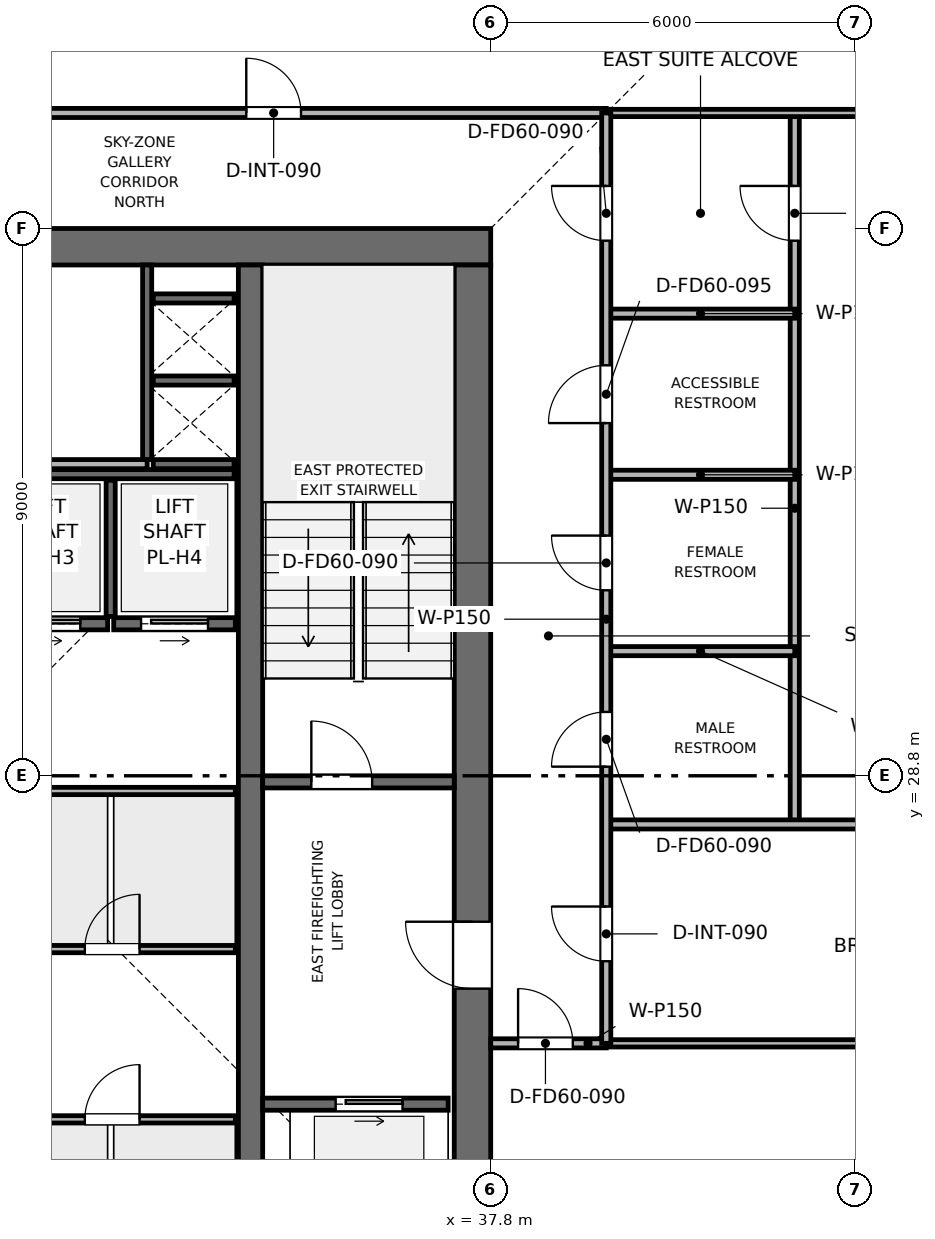
"""IFC4 building model, lengths in metres.
Left out: names, types, materials, properties, quantities, classifications, styles, units other than length and angle.
Written with IfcOpenShell. Run it as: python <this file> out.ifc"""

import sys

from ifc_helpers import new_model, si_unit, direction, frame, frame_2d, origin, place, context, subcontext, project, spatial, rectangle, extrude, element, fill, save


model = new_model("IFC4")
c1 = context("Model", 3, precision=1e-05, world=origin(), true_north=direction((0.0, 1.0)))
c2 = subcontext(c1, "Body", "Model", "MODEL_VIEW")
j1 = project(units=[si_unit("LENGTHUNIT", "METRE"), si_unit("PLANEANGLEUNIT", "RADIAN")], contexts=[c1])
p1 = place(None, origin())
s1 = spatial("IfcSite", under=j1, at=p1, CompositionType="ELEMENT")
p2 = place(p1, origin())
s2 = spatial("IfcBuilding", under=s1, at=p2, CompositionType="ELEMENT")
p3 = place(p2, frame((0.0, 0.0, 333.0)))
s3 = spatial("IfcBuildingStorey", under=s2, at=p3, CompositionType="ELEMENT", Elevation=333.0)
p4 = place(p3, frame((19.8, 37.5, 0.0), z_axis=(0.0, 0.0, 1.0), x_axis=(1.0, 0.0, 0.0)))
e1 = element("IfcWall", 1, at=p4, inside=s3, PredefinedType="SHEAR", context=c2, shape_type="SweptSolid", body=[
    extrude(rectangle(XDim=18.0, YDim=0.6, at=frame_2d((9.0, 0.0))), origin(), (0.0, 0.0, 1.0), 3.75),
])
p5 = place(p4, frame((7.05, 0.0, 0.0)))
e2 = element("IfcOpeningElement", 2, at=p5, cuts=e1, PredefinedType="OPENING", context=c2, shape_type="SweptSolid", body=[
    extrude(rectangle(XDim=1.1, YDim=2.15, at=frame_2d((0.55, 1.075))), frame((0.0, 0.31, 0.0), z_axis=(0.0, -1.0, 0.0), x_axis=(1.0, 0.0, 0.0)), (0.0, 0.0, 1.0), 0.62),
])
p6 = place(p3, frame((37.5, 20.4, 0.0), z_axis=(0.0, 0.0, 1.0), x_axis=(0.0, 1.0, 0.0)))
e3 = element("IfcWall", 3, at=p6, inside=s3, PredefinedType="SHEAR", context=c2, shape_type="SweptSolid", body=[
    extrude(rectangle(XDim=16.8, YDim=0.6, at=frame_2d((8.4, 0.0))), origin(), (0.0, 0.0, 1.0), 3.75),
])
p7 = place(p6, frame((4.9, 0.0, 0.0)))
e4 = element("IfcOpeningElement", 4, at=p7, cuts=e3, PredefinedType="OPENING", context=c2, shape_type="SweptSolid", body=[
    extrude(rectangle(XDim=1.1, YDim=2.15, at=frame_2d((0.55, 1.075))), frame((0.0, 0.31, 0.0), z_axis=(0.0, -1.0, 0.0), x_axis=(1.0, 0.0, 0.0)), (0.0, 0.0, 1.0), 0.62),
])
p8 = place(p3, frame((33.85, 20.4, 0.0), z_axis=(0.0, 0.0, 1.0), x_axis=(0.0, 1.0, 0.0)))
e5 = element("IfcWall", 5, at=p8, inside=s3, PredefinedType="SHEAR", context=c2, shape_type="SweptSolid", body=[
    extrude(rectangle(XDim=16.8, YDim=0.4, at=frame_2d((8.4, 0.0))), origin(), (0.0, 0.0, 1.0), 3.75),
])
p9 = place(p3, frame((34.05, 28.7, 0.0), z_axis=(0.0, 0.0, 1.0), x_axis=(1.0, 0.0, 0.0)))
e6 = element("IfcWall", 6, at=p9, inside=s3, PredefinedType="SHEAR", context=c2, shape_type="SweptSolid", body=[
    extrude(rectangle(XDim=3.15, YDim=0.2, at=frame_2d((1.575, 0.0))), origin(), (0.0, 0.0, 1.0), 3.51),
])
p10 = place(p9, frame((0.8, 0.0, 0.0)))
e7 = element("IfcOpeningElement", 7, at=p10, cuts=e6, PredefinedType="OPENING", context=c2, shape_type="SweptSolid", body=[
    extrude(rectangle(XDim=1.0, YDim=2.1, at=frame_2d((0.5, 1.05))), frame((0.0, 0.11, 0.0), z_axis=(0.0, -1.0, 0.0), x_axis=(1.0, 0.0, 0.0)), (0.0, 0.0, 1.0), 0.22),
])
p11 = place(p3, frame((32.15, 34.0, 0.0), z_axis=(0.0, 0.0, 1.0), x_axis=(0.0, 1.0, 0.0)))
e8 = element("IfcWall", 8, at=p11, inside=s3, PredefinedType="SHEAR", context=c2, shape_type="SweptSolid", body=[
    extrude(rectangle(XDim=3.2, YDim=0.15, at=frame_2d((1.6, 0.0))), origin(), (0.0, 0.0, 1.0), 3.51),
])
for number, where, z_axis, x_axis in (
    (9, (32.25, 33.925, 0.0), (0.0, 0.0, 1.0), (1.0, 0.0, 0.0)),
    (10, (32.25, 35.3, 0.0), (0.0, 0.0, 1.0), (1.0, 0.0, 0.0)),
):
    element("IfcWall", number, at=place(p3, frame(where, z_axis=z_axis, x_axis=x_axis)), inside=s3, PredefinedType="SHEAR", context=c2, shape_type="SweptSolid", body=[
        extrude(rectangle(XDim=1.33, YDim=0.15, at=frame_2d((0.665, 0.0))), origin(), (0.0, 0.0, 1.0), 3.51),
    ])
p12 = place(p3, frame((34.05, 23.4, 0.0), z_axis=(0.0, 0.0, 1.0), x_axis=(1.0, 0.0, 0.0)))
e11 = element("IfcWall", 11, at=p12, inside=s3, PredefinedType="SHEAR", context=c2, shape_type="SweptSolid", body=[
    extrude(rectangle(XDim=3.05, YDim=0.2, at=frame_2d((1.525, 0.0))), origin(), (0.0, 0.0, 1.0), 3.51),
])
p13 = place(p12, frame((1.2, 0.0, 0.0)))
e12 = element("IfcOpeningElement", 12, at=p13, cuts=e11, PredefinedType="OPENING", context=c2, shape_type="SweptSolid", body=[
    extrude(rectangle(XDim=1.1, YDim=2.15, at=frame_2d((0.55, 1.075))), frame((0.0, 0.11, 0.0), z_axis=(0.0, -1.0, 0.0), x_axis=(1.0, 0.0, 0.0)), (0.0, 0.0, 1.0), 0.22),
])
p14 = place(p3, frame((29.5, 31.3, 0.0), z_axis=(0.0, 0.0, 1.0), x_axis=(1.0, 0.0, 0.0)))
e13 = element("IfcWall", 13, at=p14, inside=s3, PredefinedType="SHEAR", context=c2, shape_type="SweptSolid", body=[
    extrude(rectangle(XDim=2.0, YDim=0.2, at=frame_2d((1.0, 0.0))), origin(), (0.0, 0.0, 1.0), 3.51),
])
p15 = place(p14, frame((0.45, 0.0, 0.0)))
e14 = element("IfcOpeningElement", 14, at=p15, cuts=e13, PredefinedType="OPENING", context=c2, shape_type="SweptSolid", body=[
    extrude(rectangle(XDim=1.1, YDim=2.15, at=frame_2d((0.55, 1.075))), frame((0.0, 0.11, 0.0), z_axis=(0.0, -1.0, 0.0), x_axis=(1.0, 0.0, 0.0)), (0.0, 0.0, 1.0), 0.22),
])
p16 = place(p3, frame((31.6, 31.3, 0.0), z_axis=(0.0, 0.0, 1.0), x_axis=(1.0, 0.0, 0.0)))
e15 = element("IfcWall", 15, at=p16, inside=s3, PredefinedType="SHEAR", context=c2, shape_type="SweptSolid", body=[
    extrude(rectangle(XDim=2.0, YDim=0.2, at=frame_2d((1.0, 0.0))), origin(), (0.0, 0.0, 1.0), 3.51),
])
p17 = place(p16, frame((0.45, 0.0, 0.0)))
e16 = element("IfcOpeningElement", 16, at=p17, cuts=e15, PredefinedType="OPENING", context=c2, shape_type="SweptSolid", body=[
    extrude(rectangle(XDim=1.1, YDim=2.15, at=frame_2d((0.55, 1.075))), frame((0.0, 0.11, 0.0), z_axis=(0.0, -1.0, 0.0), x_axis=(1.0, 0.0, 0.0)), (0.0, 0.0, 1.0), 0.22),
])
p18 = place(p3, frame((32.25, 36.65, 0.0), z_axis=(0.0, 0.0, 1.0), x_axis=(1.0, 0.0, 0.0)))
e17 = element("IfcWall", 17, at=p18, inside=s3, PredefinedType="SHEAR", context=c2, shape_type="SweptSolid", body=[
    extrude(rectangle(XDim=1.33, YDim=0.15, at=frame_2d((0.665, 0.0))), origin(), (0.0, 0.0, 1.0), 3.51),
])
p19 = place(p3, frame((29.5, 33.76, 0.0), z_axis=(0.0, 0.0, 1.0), x_axis=(1.0, 0.0, 0.0)))
e18 = element("IfcWall", 18, at=p19, inside=s3, PredefinedType="SHEAR", context=c2, shape_type="SweptSolid", body=[
    extrude(rectangle(XDim=4.08, YDim=0.15, at=frame_2d((2.04, 0.0))), origin(), (0.0, 0.0, 1.0), 3.51),
])
p20 = place(p3, frame((31.55, 31.42, 0.0), z_axis=(0.0, 0.0, 1.0), x_axis=(0.0, 1.0, 0.0)))
e19 = element("IfcWall", 19, at=p20, inside=s3, PredefinedType="SHEAR", context=c2, shape_type="SweptSolid", body=[
    extrude(rectangle(XDim=2.24, YDim=0.15, at=frame_2d((1.12, 0.0))), origin(), (0.0, 0.0, 1.0), 3.51),
])
p21 = place(p3, frame((29.525, 33.925, 0.0), z_axis=(0.0, 0.0, 1.0), x_axis=(1.0, 0.0, 0.0)))
e20 = element("IfcWall", 20, at=p21, inside=s3, PredefinedType="PARTITIONING", context=c2, shape_type="SweptSolid", body=[
    extrude(rectangle(XDim=2.625, YDim=0.15, at=frame_2d((1.312, 0.0))), origin(), (0.0, 0.0, 1.0), 3.51),
])
p22 = place(p3, frame((29.55, 23.15, 0.0), z_axis=(0.0, 0.0, 1.0), x_axis=(1.0, 0.0, 0.0)))
e21 = element("IfcWall", 21, at=p22, inside=s3, PredefinedType="PARTITIONING", context=c2, shape_type="SweptSolid", body=[
    extrude(rectangle(XDim=4.05, YDim=0.12, at=frame_2d((2.025, 0.0))), origin(), (0.0, 0.0, 1.0), 3.51),
])
p23 = place(p22, frame((1.575, 0.0, 0.0)))
e22 = element("IfcOpeningElement", 22, at=p23, cuts=e21, PredefinedType="OPENING", context=c2, shape_type="SweptSolid", body=[
    extrude(rectangle(XDim=0.9, YDim=2.1, at=frame_2d((0.45, 1.05))), frame((0.0, 0.07, 0.0), z_axis=(0.0, -1.0, 0.0), x_axis=(1.0, 0.0, 0.0)), (0.0, 0.0, 1.0), 0.14),
])
p24 = place(p3, frame((29.55, 25.95, 0.0), z_axis=(0.0, 0.0, 1.0), x_axis=(1.0, 0.0, 0.0)))
e23 = element("IfcWall", 23, at=p24, inside=s3, PredefinedType="PARTITIONING", context=c2, shape_type="SweptSolid", body=[
    extrude(rectangle(XDim=4.05, YDim=0.12, at=frame_2d((2.025, 0.0))), origin(), (0.0, 0.0, 1.0), 3.51),
])
p25 = place(p24, frame((1.575, 0.0, 0.0)))
e24 = element("IfcOpeningElement", 24, at=p25, cuts=e23, PredefinedType="OPENING", context=c2, shape_type="SweptSolid", body=[
    extrude(rectangle(XDim=0.9, YDim=2.1, at=frame_2d((0.45, 1.05))), frame((0.0, 0.07, 0.0), z_axis=(0.0, -1.0, 0.0), x_axis=(1.0, 0.0, 0.0)), (0.0, 0.0, 1.0), 0.14),
])
p26 = place(p3, frame((29.55, 28.55, 0.0), z_axis=(0.0, 0.0, 1.0), x_axis=(1.0, 0.0, 0.0)))
e25 = element("IfcWall", 25, at=p26, inside=s3, PredefinedType="PARTITIONING", context=c2, shape_type="SweptSolid", body=[
    extrude(rectangle(XDim=4.05, YDim=0.12, at=frame_2d((2.025, 0.0))), origin(), (0.0, 0.0, 1.0), 3.51),
])
p27 = place(p3, frame((37.8, 24.4, 0.0), z_axis=(0.0, 0.0, 1.0), x_axis=(1.0, 0.0, 0.0)))
e26 = element("IfcWall", 26, at=p27, inside=s3, PredefinedType="PARTITIONING", context=c2, shape_type="SweptSolid", body=[
    extrude(rectangle(XDim=1.9, YDim=0.15, at=frame_2d((0.95, 0.0))), origin(), (0.0, 0.0, 1.0), 3.51),
])
p28 = place(p27, frame((0.45, 0.0, 0.0)))
e27 = element("IfcOpeningElement", 27, at=p28, cuts=e26, PredefinedType="OPENING", context=c2, shape_type="SweptSolid", body=[
    extrude(rectangle(XDim=0.9, YDim=2.1, at=frame_2d((0.45, 1.05))), frame((0.0, 0.085, 0.0), z_axis=(0.0, -1.0, 0.0), x_axis=(1.0, 0.0, 0.0)), (0.0, 0.0, 1.0), 0.17),
])
p29 = place(p3, frame((39.7, 24.4, 0.0), z_axis=(0.0, 0.0, 1.0), x_axis=(1.0, 0.0, 0.0)))
e28 = element("IfcWall", 28, at=p29, inside=s3, PredefinedType="PARTITIONING", context=c2, shape_type="SweptSolid", body=[
    extrude(rectangle(XDim=11.17, YDim=0.12, at=frame_2d((5.585, 0.0))), origin(), (0.0, 0.0, 1.0), 3.135),
])
p30 = place(p3, frame((42.8, 28.0, 0.0), z_axis=(0.0, 0.0, 1.0), x_axis=(0.0, 1.0, 0.0)))
e29 = element("IfcWall", 29, at=p30, inside=s3, PredefinedType="PARTITIONING", context=c2, shape_type="SweptSolid", body=[
    extrude(rectangle(XDim=11.7, YDim=0.15, at=frame_2d((5.85, 0.0))), origin(), (0.0, 0.0, 1.0), 3.095),
])
p31 = place(p30, frame((9.6, 0.0, 0.0)))
e30 = element("IfcOpeningElement", 30, at=p31, cuts=e29, PredefinedType="OPENING", context=c2, shape_type="SweptSolid", body=[
    extrude(rectangle(XDim=0.9, YDim=2.1, at=frame_2d((0.45, 1.05))), frame((0.0, 0.085, 0.0), z_axis=(0.0, -1.0, 0.0), x_axis=(1.0, 0.0, 0.0)), (0.0, 0.0, 1.0), 0.17),
])
p32 = place(p3, frame((39.7, 28.0, 0.0), z_axis=(0.0, 0.0, 1.0), x_axis=(1.0, 0.0, 0.0)))
e31 = element("IfcWall", 31, at=p32, inside=s3, PredefinedType="PARTITIONING", context=c2, shape_type="SweptSolid", body=[
    extrude(rectangle(XDim=11.17, YDim=0.15, at=frame_2d((5.585, 0.0))), origin(), (0.0, 0.0, 1.0), 3.135),
])
for number, where, z_axis, x_axis in (
    (32, (39.7, 36.4, 0.0), (0.0, 0.0, 1.0), (1.0, 0.0, 0.0)),
    (33, (39.7, 30.85, 0.0), (0.0, 0.0, 1.0), (1.0, 0.0, 0.0)),
    (34, (39.7, 33.75, 0.0), (0.0, 0.0, 1.0), (1.0, 0.0, 0.0)),
):
    element("IfcWall", number, at=place(p3, frame(where, z_axis=z_axis, x_axis=x_axis)), inside=s3, PredefinedType="PARTITIONING", context=c2, shape_type="SweptSolid", body=[
        extrude(rectangle(XDim=3.1, YDim=0.15, at=frame_2d((1.55, 0.0))), origin(), (0.0, 0.0, 1.0), 3.135),
    ])
p33 = place(p3, frame((39.7, 39.7, 0.0), z_axis=(0.0, 0.0, 1.0), x_axis=(1.0, 0.0, 0.0)))
e35 = element("IfcWall", 35, at=p33, inside=s3, PredefinedType="PARTITIONING", context=c2, shape_type="SweptSolid", body=[
    extrude(rectangle(XDim=11.17, YDim=0.12, at=frame_2d((5.585, 0.0))), origin(), (0.0, 0.0, 1.0), 3.095),
])
p34 = place(p3, frame((17.9, 39.7, 0.0), z_axis=(0.0, 0.0, 1.0), x_axis=(1.0, 0.0, 0.0)))
e36 = element("IfcWall", 36, at=p34, inside=s3, PredefinedType="PARTITIONING", context=c2, shape_type="SweptSolid", body=[
    extrude(rectangle(XDim=21.8, YDim=0.15, at=frame_2d((10.9, 0.0))), origin(), (0.0, 0.0, 1.0), 3.095),
])
p35 = place(p34, frame((0.765, 0.0, 0.0)))
e37 = element("IfcOpeningElement", 37, at=p35, cuts=e36, PredefinedType="OPENING", context=c2, shape_type="SweptSolid", body=[
    extrude(rectangle(XDim=0.9, YDim=2.1, at=frame_2d((0.45, 1.05))), frame((0.0, 0.085, 0.0), z_axis=(0.0, -1.0, 0.0), x_axis=(1.0, 0.0, 0.0)), (0.0, 0.0, 1.0), 0.17),
])
p36 = place(p34, frame((6.195, 0.0, 0.0)))
e38 = element("IfcOpeningElement", 38, at=p36, cuts=e36, PredefinedType="OPENING", context=c2, shape_type="SweptSolid", body=[
    extrude(rectangle(XDim=0.9, YDim=2.1, at=frame_2d((0.45, 1.05))), frame((0.0, 0.085, 0.0), z_axis=(0.0, -1.0, 0.0), x_axis=(1.0, 0.0, 0.0)), (0.0, 0.0, 1.0), 0.17),
])
p37 = place(p34, frame((15.88, 0.0, 0.0)))
e39 = element("IfcOpeningElement", 39, at=p37, cuts=e36, PredefinedType="OPENING", context=c2, shape_type="SweptSolid", body=[
    extrude(rectangle(XDim=0.9, YDim=2.1, at=frame_2d((0.45, 1.05))), frame((0.0, 0.085, 0.0), z_axis=(0.0, -1.0, 0.0), x_axis=(1.0, 0.0, 0.0)), (0.0, 0.0, 1.0), 0.17),
])
p38 = place(p3, frame((39.7, 24.4, 0.0), z_axis=(0.0, 0.0, 1.0), x_axis=(0.0, 1.0, 0.0)))
e40 = element("IfcWall", 40, at=p38, inside=s3, PredefinedType="PARTITIONING", context=c2, shape_type="SweptSolid", body=[
    extrude(rectangle(XDim=15.3, YDim=0.15, at=frame_2d((7.65, 0.0))), origin(), (0.0, 0.0, 1.0), 3.095),
])
p39 = place(p38, frame((1.35, 0.0, 0.0)))
e41 = element("IfcOpeningElement", 41, at=p39, cuts=e40, PredefinedType="OPENING", context=c2, shape_type="SweptSolid", body=[
    extrude(rectangle(XDim=0.9, YDim=2.1, at=frame_2d((0.45, 1.05))), frame((0.0, 0.085, 0.0), z_axis=(0.0, -1.0, 0.0), x_axis=(1.0, 0.0, 0.0)), (0.0, 0.0, 1.0), 0.17),
])
p40 = place(p38, frame((4.55, 0.0, 0.0)))
e42 = element("IfcOpeningElement", 42, at=p40, cuts=e40, PredefinedType="OPENING", context=c2, shape_type="SweptSolid", body=[
    extrude(rectangle(XDim=0.9, YDim=2.1, at=frame_2d((0.45, 1.05))), frame((0.0, 0.085, 0.0), z_axis=(0.0, -1.0, 0.0), x_axis=(1.0, 0.0, 0.0)), (0.0, 0.0, 1.0), 0.17),
])
p41 = place(p38, frame((7.45, 0.0, 0.0)))
e43 = element("IfcOpeningElement", 43, at=p41, cuts=e40, PredefinedType="OPENING", context=c2, shape_type="SweptSolid", body=[
    extrude(rectangle(XDim=0.9, YDim=2.1, at=frame_2d((0.45, 1.05))), frame((0.0, 0.085, 0.0), z_axis=(0.0, -1.0, 0.0), x_axis=(1.0, 0.0, 0.0)), (0.0, 0.0, 1.0), 0.17),
])
p42 = place(p38, frame((10.2, 0.0, 0.0)))
e44 = element("IfcOpeningElement", 44, at=p42, cuts=e40, PredefinedType="OPENING", context=c2, shape_type="SweptSolid", body=[
    extrude(rectangle(XDim=0.95, YDim=2.1, at=frame_2d((0.475, 1.05))), frame((0.0, 0.085, 0.0), z_axis=(0.0, -1.0, 0.0), x_axis=(1.0, 0.0, 0.0)), (0.0, 0.0, 1.0), 0.17),
])
p43 = place(p38, frame((13.2, 0.0, 0.0)))
e45 = element("IfcOpeningElement", 45, at=p43, cuts=e40, PredefinedType="OPENING", context=c2, shape_type="SweptSolid", body=[
    extrude(rectangle(XDim=0.9, YDim=2.1, at=frame_2d((0.45, 1.05))), frame((0.0, 0.085, 0.0), z_axis=(0.0, -1.0, 0.0), x_axis=(1.0, 0.0, 0.0)), (0.0, 0.0, 1.0), 0.17),
])
p44 = place(p10, origin())
e46 = element("IfcDoor", 46, at=p44, inside=s3, OperationType="SINGLE_SWING_LEFT", PredefinedType="DOOR", context=c2, shape_type="SweptSolid", body=[
    extrude(rectangle(XDim=1.0, YDim=2.1, at=frame_2d((0.5, 1.05))), frame((0.0, 0.025, 0.0), z_axis=(0.0, -1.0, 0.0), x_axis=(1.0, 0.0, 0.0)), (0.0, 0.0, 1.0), 0.05),
])
fill(e7, e46)
p45 = place(p13, origin())
e47 = element("IfcDoor", 47, at=p45, inside=s3, OperationType="SLIDING_TO_RIGHT", PredefinedType="DOOR", context=c2, shape_type="SweptSolid", body=[
    extrude(rectangle(XDim=1.1, YDim=2.15, at=frame_2d((0.55, 1.075))), frame((0.0, 0.025, 0.0), z_axis=(0.0, -1.0, 0.0), x_axis=(1.0, 0.0, 0.0)), (0.0, 0.0, 1.0), 0.05),
])
fill(e12, e47)
p46 = place(p15, origin())
e48 = element("IfcDoor", 48, at=p46, inside=s3, OperationType="SLIDING_TO_RIGHT", PredefinedType="DOOR", context=c2, shape_type="SweptSolid", body=[
    extrude(rectangle(XDim=1.1, YDim=2.15, at=frame_2d((0.55, 1.075))), frame((0.0, 0.025, 0.0), z_axis=(0.0, -1.0, 0.0), x_axis=(1.0, 0.0, 0.0)), (0.0, 0.0, 1.0), 0.05),
])
fill(e14, e48)
p47 = place(p17, origin())
e49 = element("IfcDoor", 49, at=p47, inside=s3, OperationType="SLIDING_TO_RIGHT", PredefinedType="DOOR", context=c2, shape_type="SweptSolid", body=[
    extrude(rectangle(XDim=1.1, YDim=2.15, at=frame_2d((0.55, 1.075))), frame((0.0, 0.025, 0.0), z_axis=(0.0, -1.0, 0.0), x_axis=(1.0, 0.0, 0.0)), (0.0, 0.0, 1.0), 0.05),
])
fill(e16, e49)
p48 = place(p23, origin())
e50 = element("IfcDoor", 50, at=p48, inside=s3, OperationType="SINGLE_SWING_RIGHT", PredefinedType="DOOR", context=c2, shape_type="SweptSolid", body=[
    extrude(rectangle(XDim=0.9, YDim=2.1, at=frame_2d((0.45, 1.05))), frame((0.0, 0.025, 0.0), z_axis=(0.0, -1.0, 0.0), x_axis=(1.0, 0.0, 0.0)), (0.0, 0.0, 1.0), 0.05),
])
fill(e22, e50)
p49 = place(p25, origin())
e51 = element("IfcDoor", 51, at=p49, inside=s3, OperationType="SINGLE_SWING_RIGHT", PredefinedType="DOOR", context=c2, shape_type="SweptSolid", body=[
    extrude(rectangle(XDim=0.9, YDim=2.1, at=frame_2d((0.45, 1.05))), frame((0.0, 0.025, 0.0), z_axis=(0.0, -1.0, 0.0), x_axis=(1.0, 0.0, 0.0)), (0.0, 0.0, 1.0), 0.05),
])
fill(e24, e51)
p50 = place(p28, origin())
e52 = element("IfcDoor", 52, at=p50, inside=s3, OperationType="SINGLE_SWING_LEFT", PredefinedType="DOOR", context=c2, shape_type="SweptSolid", body=[
    extrude(rectangle(XDim=0.9, YDim=2.1, at=frame_2d((0.45, 1.05))), frame((0.0, 0.025, 0.0), z_axis=(0.0, -1.0, 0.0), x_axis=(1.0, 0.0, 0.0)), (0.0, 0.0, 1.0), 0.05),
])
fill(e27, e52)
p51 = place(p31, origin())
e53 = element("IfcDoor", 53, at=p51, inside=s3, OperationType="SINGLE_SWING_RIGHT", PredefinedType="DOOR", context=c2, shape_type="SweptSolid", body=[
    extrude(rectangle(XDim=0.9, YDim=2.1, at=frame_2d((0.45, 1.05))), frame((0.0, 0.025, 0.0), z_axis=(0.0, -1.0, 0.0), x_axis=(1.0, 0.0, 0.0)), (0.0, 0.0, 1.0), 0.05),
])
fill(e30, e53)
p52 = place(p37, origin())
e54 = element("IfcDoor", 54, at=p52, inside=s3, OperationType="SINGLE_SWING_LEFT", PredefinedType="DOOR", context=c2, shape_type="SweptSolid", body=[
    extrude(rectangle(XDim=0.9, YDim=2.1, at=frame_2d((0.45, 1.05))), frame((0.0, 0.025, 0.0), z_axis=(0.0, -1.0, 0.0), x_axis=(1.0, 0.0, 0.0)), (0.0, 0.0, 1.0), 0.05),
])
fill(e39, e54)
p53 = place(p39, origin())
e55 = element("IfcDoor", 55, at=p53, inside=s3, OperationType="SINGLE_SWING_RIGHT", PredefinedType="DOOR", context=c2, shape_type="SweptSolid", body=[
    extrude(rectangle(XDim=0.9, YDim=2.1, at=frame_2d((0.45, 1.05))), frame((0.0, 0.025, 0.0), z_axis=(0.0, -1.0, 0.0), x_axis=(1.0, 0.0, 0.0)), (0.0, 0.0, 1.0), 0.05),
])
fill(e41, e55)
p54 = place(p40, origin())
e56 = element("IfcDoor", 56, at=p54, inside=s3, OperationType="SINGLE_SWING_LEFT", PredefinedType="DOOR", context=c2, shape_type="SweptSolid", body=[
    extrude(rectangle(XDim=0.9, YDim=2.1, at=frame_2d((0.45, 1.05))), frame((0.0, 0.025, 0.0), z_axis=(0.0, -1.0, 0.0), x_axis=(1.0, 0.0, 0.0)), (0.0, 0.0, 1.0), 0.05),
])
fill(e42, e56)
p55 = place(p41, origin())
e57 = element("IfcDoor", 57, at=p55, inside=s3, OperationType="SINGLE_SWING_RIGHT", PredefinedType="DOOR", context=c2, shape_type="SweptSolid", body=[
    extrude(rectangle(XDim=0.9, YDim=2.1, at=frame_2d((0.45, 1.05))), frame((0.0, 0.025, 0.0), z_axis=(0.0, -1.0, 0.0), x_axis=(1.0, 0.0, 0.0)), (0.0, 0.0, 1.0), 0.05),
])
fill(e43, e57)
p56 = place(p42, origin())
e58 = element("IfcDoor", 58, at=p56, inside=s3, OperationType="SINGLE_SWING_LEFT", PredefinedType="DOOR", context=c2, shape_type="SweptSolid", body=[
    extrude(rectangle(XDim=0.95, YDim=2.1, at=frame_2d((0.475, 1.05))), frame((0.0, 0.025, 0.0), z_axis=(0.0, -1.0, 0.0), x_axis=(1.0, 0.0, 0.0)), (0.0, 0.0, 1.0), 0.05),
])
fill(e44, e58)
p57 = place(p43, origin())
e59 = element("IfcDoor", 59, at=p57, inside=s3, OperationType="SINGLE_SWING_RIGHT", PredefinedType="DOOR", context=c2, shape_type="SweptSolid", body=[
    extrude(rectangle(XDim=0.9, YDim=2.1, at=frame_2d((0.45, 1.05))), frame((0.0, 0.025, 0.0), z_axis=(0.0, -1.0, 0.0), x_axis=(1.0, 0.0, 0.0)), (0.0, 0.0, 1.0), 0.05),
])
fill(e45, e59)
p58 = place(p7, origin())
e60 = element("IfcDoor", 60, at=p58, inside=s3, OperationType="SINGLE_SWING_RIGHT", PredefinedType="DOOR", context=c2, shape_type="SweptSolid", body=[
    extrude(rectangle(XDim=1.1, YDim=2.15, at=frame_2d((0.55, 1.075))), frame((0.0, 0.025, 0.0), z_axis=(0.0, -1.0, 0.0), x_axis=(1.0, 0.0, 0.0)), (0.0, 0.0, 1.0), 0.05),
])
fill(e4, e60)
save(model, sys.argv[1])
